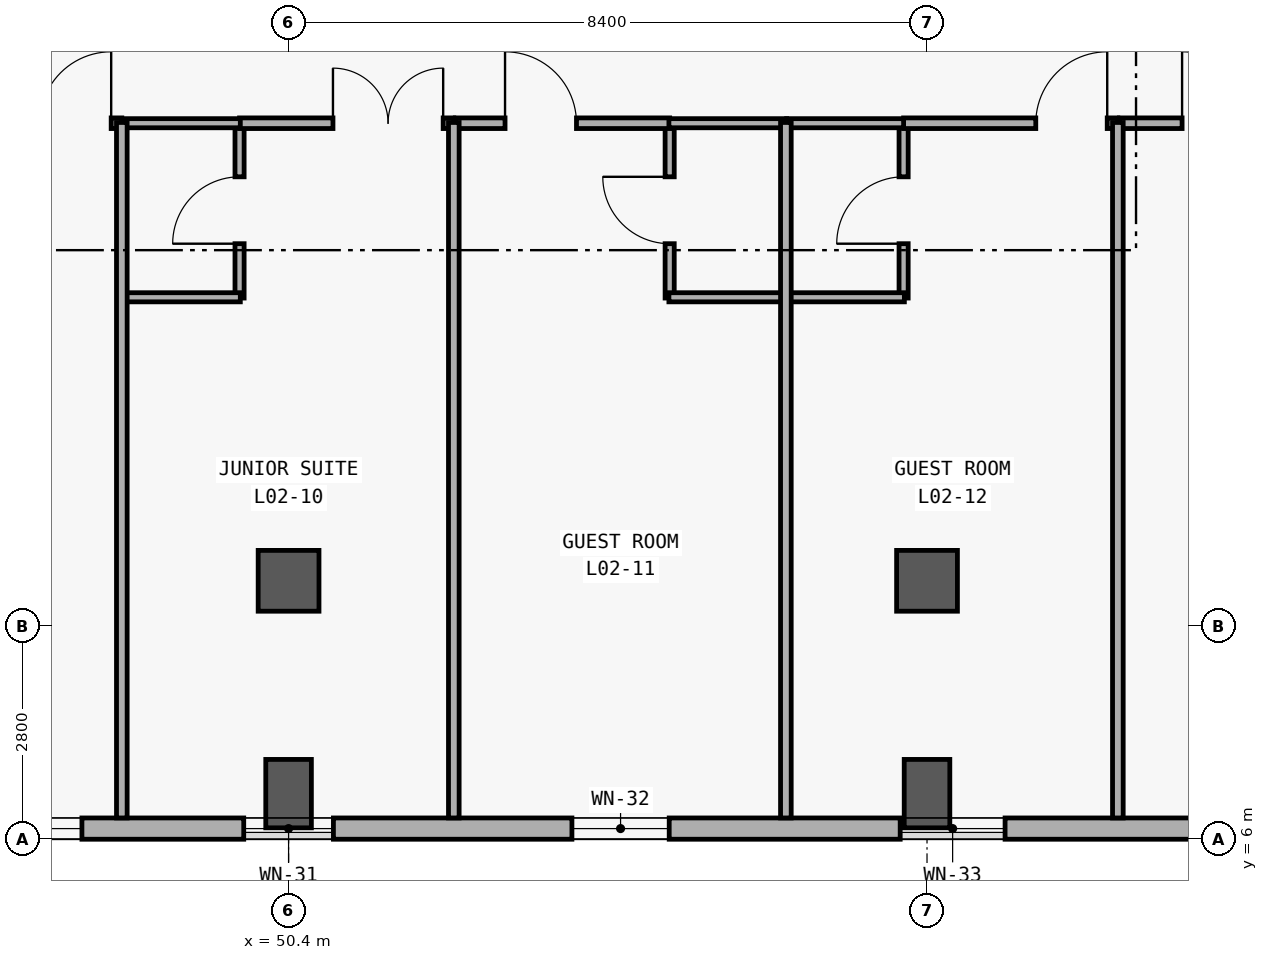
"""IFC4 building model, lengths in metres.
Left out: names, types, materials, properties, quantities, classifications, styles, units other than length and angle.
Written with IfcOpenShell. Run it as: python <this file> out.ifc"""

import sys

from ifc_helpers import new_model, si_unit, direction, frame, frame_2d, origin, origin_2d, place, context, subcontext, project, spatial, rectangle, extrude, element, fill, save


model = new_model("IFC4")
c1 = context("Model", 3, precision=1e-05, world=origin(), true_north=direction((0.0, 1.0)))
c2 = subcontext(c1, "Body", "Model", "MODEL_VIEW")
j1 = project(units=[si_unit("LENGTHUNIT", "METRE"), si_unit("PLANEANGLEUNIT", "RADIAN")], contexts=[c1])
p1 = place(None, origin())
s1 = spatial("IfcSite", under=j1, at=p1, CompositionType="ELEMENT")
p2 = place(p1, origin())
s2 = spatial("IfcBuilding", under=s1, at=p2, CompositionType="ELEMENT")
p3 = place(p2, frame((0.0, 0.0, 10.8)))
s3 = spatial("IfcBuildingStorey", under=s2, at=p3, CompositionType="ELEMENT", Elevation=10.8)
p4 = place(p3, frame((50.4, 6.6, 0.0), z_axis=(0.0, 0.0, 1.0), x_axis=(0.0, 1.0, 0.0)))
e1 = element("IfcColumn", 1, at=p4, inside=s3, PredefinedType="COLUMN", context=c2, shape_type="SweptSolid", body=[
    extrude(rectangle(XDim=0.6, YDim=0.9, at=origin_2d()), origin(), (0.0, 0.0, 1.0), 4.2),
])
p5 = place(p3, frame((50.4, 9.4, 0.0), z_axis=(0.0, 0.0, 1.0), x_axis=(1.0, 0.0, 0.0)))
e2 = element("IfcColumn", 2, at=p5, inside=s3, PredefinedType="COLUMN", context=c2, shape_type="SweptSolid", body=[
    extrude(rectangle(XDim=0.8, YDim=0.8, at=origin_2d()), origin(), (0.0, 0.0, 1.0), 4.2),
])
p6 = place(p3, frame((58.8, 6.6, 0.0), z_axis=(0.0, 0.0, 1.0), x_axis=(0.0, 1.0, 0.0)))
e3 = element("IfcColumn", 3, at=p6, inside=s3, PredefinedType="COLUMN", context=c2, shape_type="SweptSolid", body=[
    extrude(rectangle(XDim=0.6, YDim=0.9, at=origin_2d()), origin(), (0.0, 0.0, 1.0), 4.2),
])
p7 = place(p3, frame((58.8, 9.4, 0.0), z_axis=(0.0, 0.0, 1.0), x_axis=(1.0, 0.0, 0.0)))
e4 = element("IfcColumn", 4, at=p7, inside=s3, PredefinedType="COLUMN", context=c2, shape_type="SweptSolid", body=[
    extrude(rectangle(XDim=0.8, YDim=0.8, at=origin_2d()), origin(), (0.0, 0.0, 1.0), 4.2),
])
p8 = place(p3, frame((92.12, 6.14, 0.0), z_axis=(0.0, 0.0, 1.0), x_axis=(-1.0, 0.0, 0.0)))
e5 = element("IfcWall", 5, at=p8, inside=s3, PredefinedType="SOLIDWALL", context=c2, shape_type="SweptSolid", body=[
    extrude(rectangle(XDim=83.44, YDim=0.28, at=frame_2d((41.72, 0.0))), origin(), (0.0, 0.0, 1.0), 3.92),
])
p9 = place(p8, frame((79.486, 0.0, 0.85)))
e6 = element("IfcOpeningElement", 6, at=p9, cuts=e5, PredefinedType="OPENING", context=c2, shape_type="SweptSolid", body=[
    extrude(rectangle(XDim=3.1, YDim=2.2, at=frame_2d((1.55, 1.1))), frame((0.0, 0.15, 0.0), z_axis=(0.0, -1.0, 0.0), x_axis=(1.0, 0.0, 0.0)), (0.0, 0.0, 1.0), 0.3),
])
p10 = place(p8, frame((76.043, 0.0, 0.85)))
e7 = element("IfcOpeningElement", 7, at=p10, cuts=e5, PredefinedType="OPENING", context=c2, shape_type="SweptSolid", body=[
    extrude(rectangle(XDim=1.25, YDim=1.45, at=frame_2d((0.625, 0.725))), frame((0.0, 0.15, 0.0), z_axis=(0.0, -1.0, 0.0), x_axis=(1.0, 0.0, 0.0)), (0.0, 0.0, 1.0), 0.3),
])
p11 = place(p8, frame((71.624, 0.0, 0.85)))
e8 = element("IfcOpeningElement", 8, at=p11, cuts=e5, PredefinedType="OPENING", context=c2, shape_type="SweptSolid", body=[
    extrude(rectangle(XDim=1.35, YDim=1.55, at=frame_2d((0.675, 0.775))), frame((0.0, 0.15, 0.0), z_axis=(0.0, -1.0, 0.0), x_axis=(1.0, 0.0, 0.0)), (0.0, 0.0, 1.0), 0.3),
])
p12 = place(p8, frame((67.206, 0.0, 0.85)))
e9 = element("IfcOpeningElement", 9, at=p12, cuts=e5, PredefinedType="OPENING", context=c2, shape_type="SweptSolid", body=[
    extrude(rectangle(XDim=1.45, YDim=1.65, at=frame_2d((0.725, 0.825))), frame((0.0, 0.15, 0.0), z_axis=(0.0, -1.0, 0.0), x_axis=(1.0, 0.0, 0.0)), (0.0, 0.0, 1.0), 0.3),
])
p13 = place(p8, frame((62.787, 0.0, 0.85)))
e10 = element("IfcOpeningElement", 10, at=p13, cuts=e5, PredefinedType="OPENING", context=c2, shape_type="SweptSolid", body=[
    extrude(rectangle(XDim=1.55, YDim=1.65, at=frame_2d((0.775, 0.825))), frame((0.0, 0.15, 0.0), z_axis=(0.0, -1.0, 0.0), x_axis=(1.0, 0.0, 0.0)), (0.0, 0.0, 1.0), 0.3),
])
p14 = place(p8, frame((58.344, 0.0, 0.85)))
e11 = element("IfcOpeningElement", 11, at=p14, cuts=e5, PredefinedType="OPENING", context=c2, shape_type="SweptSolid", body=[
    extrude(rectangle(XDim=1.7, YDim=2.0, at=frame_2d((0.85, 1.0))), frame((0.0, 0.15, 0.0), z_axis=(0.0, -1.0, 0.0), x_axis=(1.0, 0.0, 0.0)), (0.0, 0.0, 1.0), 0.3),
])
p15 = place(p8, frame((53.675, 0.0, 0.85)))
e12 = element("IfcOpeningElement", 12, at=p15, cuts=e5, PredefinedType="OPENING", context=c2, shape_type="SweptSolid", body=[
    extrude(rectangle(XDim=2.3, YDim=2.05, at=frame_2d((1.15, 1.025))), frame((0.0, 0.15, 0.0), z_axis=(0.0, -1.0, 0.0), x_axis=(1.0, 0.0, 0.0)), (0.0, 0.0, 1.0), 0.3),
])
p16 = place(p8, frame((49.082, 0.0, 0.85)))
e13 = element("IfcOpeningElement", 13, at=p16, cuts=e5, PredefinedType="OPENING", context=c2, shape_type="SweptSolid", body=[
    extrude(rectangle(XDim=2.75, YDim=2.1, at=frame_2d((1.375, 1.05))), frame((0.0, 0.15, 0.0), z_axis=(0.0, -1.0, 0.0), x_axis=(1.0, 0.0, 0.0)), (0.0, 0.0, 1.0), 0.3),
])
p17 = place(p8, frame((44.439, 0.0, 0.85)))
e14 = element("IfcOpeningElement", 14, at=p17, cuts=e5, PredefinedType="OPENING", context=c2, shape_type="SweptSolid", body=[
    extrude(rectangle(XDim=3.3, YDim=2.15, at=frame_2d((1.65, 1.075))), frame((0.0, 0.15, 0.0), z_axis=(0.0, -1.0, 0.0), x_axis=(1.0, 0.0, 0.0)), (0.0, 0.0, 1.0), 0.3),
])
p18 = place(p8, frame((41.13, 0.0, 0.85)))
e15 = element("IfcOpeningElement", 15, at=p18, cuts=e5, PredefinedType="OPENING", context=c2, shape_type="SweptSolid", body=[
    extrude(rectangle(XDim=1.18, YDim=1.5, at=frame_2d((0.59, 0.75))), frame((0.0, 0.15, 0.0), z_axis=(0.0, -1.0, 0.0), x_axis=(1.0, 0.0, 0.0)), (0.0, 0.0, 1.0), 0.3),
])
p19 = place(p8, frame((36.712, 0.0, 0.85)))
e16 = element("IfcOpeningElement", 16, at=p19, cuts=e5, PredefinedType="OPENING", context=c2, shape_type="SweptSolid", body=[
    extrude(rectangle(XDim=1.28, YDim=1.6, at=frame_2d((0.64, 0.8))), frame((0.0, 0.15, 0.0), z_axis=(0.0, -1.0, 0.0), x_axis=(1.0, 0.0, 0.0)), (0.0, 0.0, 1.0), 0.3),
])
p20 = place(p8, frame((32.293, 0.0, 0.85)))
e17 = element("IfcOpeningElement", 17, at=p20, cuts=e5, PredefinedType="OPENING", context=c2, shape_type="SweptSolid", body=[
    extrude(rectangle(XDim=1.38, YDim=1.7, at=frame_2d((0.69, 0.85))), frame((0.0, 0.15, 0.0), z_axis=(0.0, -1.0, 0.0), x_axis=(1.0, 0.0, 0.0)), (0.0, 0.0, 1.0), 0.3),
])
p21 = place(p8, frame((27.875, 0.0, 0.85)))
e18 = element("IfcOpeningElement", 18, at=p21, cuts=e5, PredefinedType="OPENING", context=c2, shape_type="SweptSolid", body=[
    extrude(rectangle(XDim=1.48, YDim=1.8, at=frame_2d((0.74, 0.9))), frame((0.0, 0.15, 0.0), z_axis=(0.0, -1.0, 0.0), x_axis=(1.0, 0.0, 0.0)), (0.0, 0.0, 1.0), 0.3),
])
p22 = place(p8, frame((23.456, 0.0, 0.85)))
e19 = element("IfcOpeningElement", 19, at=p22, cuts=e5, PredefinedType="OPENING", context=c2, shape_type="SweptSolid", body=[
    extrude(rectangle(XDim=1.58, YDim=1.85, at=frame_2d((0.79, 0.925))), frame((0.0, 0.15, 0.0), z_axis=(0.0, -1.0, 0.0), x_axis=(1.0, 0.0, 0.0)), (0.0, 0.0, 1.0), 0.3),
])
p23 = place(p8, frame((19.038, 0.0, 0.85)))
e20 = element("IfcOpeningElement", 20, at=p23, cuts=e5, PredefinedType="OPENING", context=c2, shape_type="SweptSolid", body=[
    extrude(rectangle(XDim=1.68, YDim=1.9, at=frame_2d((0.84, 0.95))), frame((0.0, 0.15, 0.0), z_axis=(0.0, -1.0, 0.0), x_axis=(1.0, 0.0, 0.0)), (0.0, 0.0, 1.0), 0.3),
])
p24 = place(p8, frame((14.62, 0.0, 0.85)))
e21 = element("IfcOpeningElement", 21, at=p24, cuts=e5, PredefinedType="OPENING", context=c2, shape_type="SweptSolid", body=[
    extrude(rectangle(XDim=1.78, YDim=1.95, at=frame_2d((0.89, 0.975))), frame((0.0, 0.15, 0.0), z_axis=(0.0, -1.0, 0.0), x_axis=(1.0, 0.0, 0.0)), (0.0, 0.0, 1.0), 0.3),
])
p25 = place(p8, frame((10.201, 0.0, 0.85)))
e22 = element("IfcOpeningElement", 22, at=p25, cuts=e5, PredefinedType="OPENING", context=c2, shape_type="SweptSolid", body=[
    extrude(rectangle(XDim=1.88, YDim=1.95, at=frame_2d((0.94, 0.975))), frame((0.0, 0.15, 0.0), z_axis=(0.0, -1.0, 0.0), x_axis=(1.0, 0.0, 0.0)), (0.0, 0.0, 1.0), 0.3),
])
p26 = place(p8, frame((5.748, 0.0, 0.85)))
e23 = element("IfcOpeningElement", 23, at=p26, cuts=e5, PredefinedType="OPENING", context=c2, shape_type="SweptSolid", body=[
    extrude(rectangle(XDim=2.05, YDim=1.95, at=frame_2d((1.025, 0.975))), frame((0.0, 0.15, 0.0), z_axis=(0.0, -1.0, 0.0), x_axis=(1.0, 0.0, 0.0)), (0.0, 0.0, 1.0), 0.3),
])
p27 = place(p8, frame((1.314, 0.0, 0.85)))
e24 = element("IfcOpeningElement", 24, at=p27, cuts=e5, PredefinedType="OPENING", context=c2, shape_type="SweptSolid", body=[
    extrude(rectangle(XDim=2.18, YDim=1.95, at=frame_2d((1.09, 0.975))), frame((0.0, 0.15, 0.0), z_axis=(0.0, -1.0, 0.0), x_axis=(1.0, 0.0, 0.0)), (0.0, 0.0, 1.0), 0.3),
])
p28 = place(p3, frame((49.755, 13.12, 0.0), z_axis=(0.0, 0.0, 1.0), x_axis=(0.0, 1.0, 0.0)))
e25 = element("IfcWall", 25, at=p28, inside=s3, PredefinedType="PARTITIONING", context=c2, shape_type="SweptSolid", body=[
    extrude(rectangle(XDim=2.31, YDim=0.12, at=frame_2d((1.155, 0.0))), origin(), (0.0, 0.0, 1.0), 3.02),
])
p29 = place(p28, frame((0.715, 0.0, 0.0)))
e26 = element("IfcOpeningElement", 26, at=p29, cuts=e25, PredefinedType="OPENING", context=c2, shape_type="SweptSolid", body=[
    extrude(rectangle(XDim=0.88, YDim=2.15, at=frame_2d((0.44, 1.075))), frame((0.0, 0.07, 0.0), z_axis=(0.0, -1.0, 0.0), x_axis=(1.0, 0.0, 0.0)), (0.0, 0.0, 1.0), 0.14),
])
p30 = place(p3, frame((55.414, 13.12, 0.0), z_axis=(0.0, 0.0, 1.0), x_axis=(0.0, 1.0, 0.0)))
e27 = element("IfcWall", 27, at=p30, inside=s3, PredefinedType="PARTITIONING", context=c2, shape_type="SweptSolid", body=[
    extrude(rectangle(XDim=2.31, YDim=0.12, at=frame_2d((1.155, 0.0))), origin(), (0.0, 0.0, 1.0), 3.02),
])
p31 = place(p30, frame((0.715, 0.0, 0.0)))
e28 = element("IfcOpeningElement", 28, at=p31, cuts=e27, PredefinedType="OPENING", context=c2, shape_type="SweptSolid", body=[
    extrude(rectangle(XDim=0.88, YDim=2.15, at=frame_2d((0.44, 1.075))), frame((0.0, 0.07, 0.0), z_axis=(0.0, -1.0, 0.0), x_axis=(1.0, 0.0, 0.0)), (0.0, 0.0, 1.0), 0.14),
])
p32 = place(p3, frame((58.492, 13.12, 0.0), z_axis=(0.0, 0.0, 1.0), x_axis=(0.0, 1.0, 0.0)))
e29 = element("IfcWall", 29, at=p32, inside=s3, PredefinedType="PARTITIONING", context=c2, shape_type="SweptSolid", body=[
    extrude(rectangle(XDim=2.31, YDim=0.12, at=frame_2d((1.155, 0.0))), origin(), (0.0, 0.0, 1.0), 3.02),
])
p33 = place(p32, frame((0.715, 0.0, 0.0)))
e30 = element("IfcOpeningElement", 30, at=p33, cuts=e29, PredefinedType="OPENING", context=c2, shape_type="SweptSolid", body=[
    extrude(rectangle(XDim=0.88, YDim=2.15, at=frame_2d((0.44, 1.075))), frame((0.0, 0.07, 0.0), z_axis=(0.0, -1.0, 0.0), x_axis=(1.0, 0.0, 0.0)), (0.0, 0.0, 1.0), 0.14),
])
p34 = place(p3, frame((45.386, 15.42, 0.0), z_axis=(0.0, 0.0, 1.0), x_axis=(1.0, 0.0, 0.0)))
e31 = element("IfcWall", 31, at=p34, inside=s3, PredefinedType="PARTITIONING", context=c2, shape_type="SweptSolid", body=[
    extrude(rectangle(XDim=2.82, YDim=0.14, at=frame_2d((1.41, 0.0))), origin(), (0.0, 0.0, 1.0), 3.02),
])
p35 = place(p34, frame((1.74, 0.0, 0.0)))
e32 = element("IfcOpeningElement", 32, at=p35, cuts=e31, PredefinedType="OPENING", context=c2, shape_type="SweptSolid", body=[
    extrude(rectangle(XDim=0.94, YDim=2.2, at=frame_2d((0.47, 1.1))), frame((0.0, 0.08, 0.0), z_axis=(0.0, -1.0, 0.0), x_axis=(1.0, 0.0, 0.0)), (0.0, 0.0, 1.0), 0.16),
])
p36 = place(p3, frame((49.755, 15.42, 0.0), z_axis=(0.0, 0.0, 1.0), x_axis=(1.0, 0.0, 0.0)))
e33 = element("IfcWall", 33, at=p36, inside=s3, PredefinedType="PARTITIONING", context=c2, shape_type="SweptSolid", body=[
    extrude(rectangle(XDim=2.819, YDim=0.14, at=frame_2d((1.41, 0.0))), origin(), (0.0, 0.0, 1.0), 3.02),
])
p37 = place(p36, frame((1.229, 0.0, 0.0)))
e34 = element("IfcOpeningElement", 34, at=p37, cuts=e33, PredefinedType="OPENING", context=c2, shape_type="SweptSolid", body=[
    extrude(rectangle(XDim=1.45, YDim=2.3, at=frame_2d((0.725, 1.15))), frame((0.0, 0.08, 0.0), z_axis=(0.0, -1.0, 0.0), x_axis=(1.0, 0.0, 0.0)), (0.0, 0.0, 1.0), 0.16),
])
p38 = place(p3, frame((52.594, 15.42, 0.0), z_axis=(0.0, 0.0, 1.0), x_axis=(1.0, 0.0, 0.0)))
e35 = element("IfcWall", 35, at=p38, inside=s3, PredefinedType="PARTITIONING", context=c2, shape_type="SweptSolid", body=[
    extrude(rectangle(XDim=2.82, YDim=0.14, at=frame_2d((1.41, 0.0))), origin(), (0.0, 0.0, 1.0), 3.02),
])
p39 = place(p38, frame((0.654, 0.0, 0.0)))
e36 = element("IfcOpeningElement", 36, at=p39, cuts=e35, PredefinedType="OPENING", context=c2, shape_type="SweptSolid", body=[
    extrude(rectangle(XDim=0.94, YDim=2.2, at=frame_2d((0.47, 1.1))), frame((0.0, 0.08, 0.0), z_axis=(0.0, -1.0, 0.0), x_axis=(1.0, 0.0, 0.0)), (0.0, 0.0, 1.0), 0.16),
])
p40 = place(p3, frame((58.492, 15.42, 0.0), z_axis=(0.0, 0.0, 1.0), x_axis=(1.0, 0.0, 0.0)))
e37 = element("IfcWall", 37, at=p40, inside=s3, PredefinedType="PARTITIONING", context=c2, shape_type="SweptSolid", body=[
    extrude(rectangle(XDim=2.819, YDim=0.14, at=frame_2d((1.41, 0.0))), origin(), (0.0, 0.0, 1.0), 3.02),
])
p41 = place(p40, frame((1.739, 0.0, 0.0)))
e38 = element("IfcOpeningElement", 38, at=p41, cuts=e37, PredefinedType="OPENING", context=c2, shape_type="SweptSolid", body=[
    extrude(rectangle(XDim=0.94, YDim=2.2, at=frame_2d((0.47, 1.1))), frame((0.0, 0.08, 0.0), z_axis=(0.0, -1.0, 0.0), x_axis=(1.0, 0.0, 0.0)), (0.0, 0.0, 1.0), 0.16),
])
p42 = place(p3, frame((61.331, 15.42, 0.0), z_axis=(0.0, 0.0, 1.0), x_axis=(1.0, 0.0, 0.0)))
e39 = element("IfcWall", 39, at=p42, inside=s3, PredefinedType="PARTITIONING", context=c2, shape_type="SweptSolid", body=[
    extrude(rectangle(XDim=2.819, YDim=0.14, at=frame_2d((1.409, 0.0))), origin(), (0.0, 0.0, 1.0), 3.02),
])
p43 = place(p42, frame((0.825, 0.0, 0.0)))
e40 = element("IfcOpeningElement", 40, at=p43, cuts=e39, PredefinedType="OPENING", context=c2, shape_type="SweptSolid", body=[
    extrude(rectangle(XDim=0.94, YDim=2.2, at=frame_2d((0.47, 1.1))), frame((0.0, 0.08, 0.0), z_axis=(0.0, -1.0, 0.0), x_axis=(1.0, 0.0, 0.0)), (0.0, 0.0, 1.0), 0.16),
])
for number, where, z_axis, x_axis in (
    (41, (48.216, 13.13, 0.0), (0.0, 0.0, 1.0), (1.0, 0.0, 0.0)),
    (42, (48.216, 15.42, 0.0), (0.0, 0.0, 1.0), (1.0, 0.0, 0.0)),
    (43, (55.404, 13.13, 0.0), (0.0, 0.0, 1.0), (1.0, 0.0, 0.0)),
    (44, (55.404, 15.42, 0.0), (0.0, 0.0, 1.0), (1.0, 0.0, 0.0)),
):
    element("IfcWall", number, at=place(p3, frame(where, z_axis=z_axis, x_axis=x_axis)), inside=s3, PredefinedType="PARTITIONING", context=c2, shape_type="SweptSolid", body=[
        extrude(rectangle(XDim=1.549, YDim=0.12, at=frame_2d((0.774, 0.0))), origin(), (0.0, 0.0, 1.0), 3.02),
    ])
p44 = place(p3, frame((56.953, 13.13, 0.0), z_axis=(0.0, 0.0, 1.0), x_axis=(1.0, 0.0, 0.0)))
e45 = element("IfcWall", 45, at=p44, inside=s3, PredefinedType="PARTITIONING", context=c2, shape_type="SweptSolid", body=[
    extrude(rectangle(XDim=1.549, YDim=0.12, at=frame_2d((0.774, 0.0))), origin(), (0.0, 0.0, 1.0), 3.02),
])
p45 = place(p3, frame((56.953, 15.42, 0.0), z_axis=(0.0, 0.0, 1.0), x_axis=(1.0, 0.0, 0.0)))
e46 = element("IfcWall", 46, at=p45, inside=s3, PredefinedType="PARTITIONING", context=c2, shape_type="SweptSolid", body=[
    extrude(rectangle(XDim=1.539, YDim=0.12, at=frame_2d((0.77, 0.0))), origin(), (0.0, 0.0, 1.0), 3.02),
])
for number, where, z_axis, x_axis in (
    (47, (48.206, 6.28, 0.0), (0.0, 0.0, 1.0), (0.0, 1.0, 0.0)),
    (48, (52.574, 6.28, 0.0), (0.0, 0.0, 1.0), (0.0, 1.0, 0.0)),
    (49, (56.943, 6.28, 0.0), (0.0, 0.0, 1.0), (0.0, 1.0, 0.0)),
    (50, (61.311, 6.28, 0.0), (0.0, 0.0, 1.0), (0.0, 1.0, 0.0)),
):
    element("IfcWall", number, at=place(p3, frame(where, z_axis=z_axis, x_axis=x_axis)), inside=s3, PredefinedType="PARTITIONING", context=c2, shape_type="SweptSolid", body=[
        extrude(rectangle(XDim=9.15, YDim=0.14, at=frame_2d((4.575, 0.0))), origin(), (0.0, 0.0, 1.0), 3.02),
    ])
p46 = place(p17, origin())
e51 = element("IfcWindow", 51, at=p46, inside=s3, PartitioningType="SINGLE_PANEL", PredefinedType="WINDOW", context=c2, shape_type="SweptSolid", body=[
    extrude(rectangle(XDim=3.3, YDim=2.15, at=frame_2d((1.65, 1.075))), frame((0.0, 0.03, 0.0), z_axis=(0.0, -1.0, 0.0), x_axis=(1.0, 0.0, 0.0)), (0.0, 0.0, 1.0), 0.06),
])
fill(e14, e51)
p47 = place(p18, origin())
e52 = element("IfcWindow", 52, at=p47, inside=s3, PartitioningType="SINGLE_PANEL", PredefinedType="WINDOW", context=c2, shape_type="SweptSolid", body=[
    extrude(rectangle(XDim=1.18, YDim=1.5, at=frame_2d((0.59, 0.75))), frame((0.0, 0.03, 0.0), z_axis=(0.0, -1.0, 0.0), x_axis=(1.0, 0.0, 0.0)), (0.0, 0.0, 1.0), 0.06),
])
fill(e15, e52)
p48 = place(p19, origin())
e53 = element("IfcWindow", 53, at=p48, inside=s3, PartitioningType="SINGLE_PANEL", PredefinedType="WINDOW", context=c2, shape_type="SweptSolid", body=[
    extrude(rectangle(XDim=1.28, YDim=1.6, at=frame_2d((0.64, 0.8))), frame((0.0, 0.03, 0.0), z_axis=(0.0, -1.0, 0.0), x_axis=(1.0, 0.0, 0.0)), (0.0, 0.0, 1.0), 0.06),
])
fill(e16, e53)
p49 = place(p20, origin())
e54 = element("IfcWindow", 54, at=p49, inside=s3, PartitioningType="SINGLE_PANEL", PredefinedType="WINDOW", context=c2, shape_type="SweptSolid", body=[
    extrude(rectangle(XDim=1.38, YDim=1.7, at=frame_2d((0.69, 0.85))), frame((0.0, 0.03, 0.0), z_axis=(0.0, -1.0, 0.0), x_axis=(1.0, 0.0, 0.0)), (0.0, 0.0, 1.0), 0.06),
])
fill(e17, e54)
p50 = place(p29, origin())
e55 = element("IfcDoor", 55, at=p50, inside=s3, OperationType="SINGLE_SWING_LEFT", PredefinedType="DOOR", context=c2, shape_type="SweptSolid", body=[
    extrude(rectangle(XDim=0.88, YDim=2.15, at=frame_2d((0.44, 1.075))), frame((0.0, 0.025, 0.0), z_axis=(0.0, -1.0, 0.0), x_axis=(1.0, 0.0, 0.0)), (0.0, 0.0, 1.0), 0.05),
])
fill(e26, e55)
p51 = place(p31, origin())
e56 = element("IfcDoor", 56, at=p51, inside=s3, OperationType="SINGLE_SWING_RIGHT", PredefinedType="DOOR", context=c2, shape_type="SweptSolid", body=[
    extrude(rectangle(XDim=0.88, YDim=2.15, at=frame_2d((0.44, 1.075))), frame((0.0, 0.025, 0.0), z_axis=(0.0, -1.0, 0.0), x_axis=(1.0, 0.0, 0.0)), (0.0, 0.0, 1.0), 0.05),
])
fill(e28, e56)
p52 = place(p33, origin())
e57 = element("IfcDoor", 57, at=p52, inside=s3, OperationType="SINGLE_SWING_LEFT", PredefinedType="DOOR", context=c2, shape_type="SweptSolid", body=[
    extrude(rectangle(XDim=0.88, YDim=2.15, at=frame_2d((0.44, 1.075))), frame((0.0, 0.025, 0.0), z_axis=(0.0, -1.0, 0.0), x_axis=(1.0, 0.0, 0.0)), (0.0, 0.0, 1.0), 0.05),
])
fill(e30, e57)
p53 = place(p35, origin())
e58 = element("IfcDoor", 58, at=p53, inside=s3, OperationType="SINGLE_SWING_RIGHT", PredefinedType="DOOR", context=c2, shape_type="SweptSolid", body=[
    extrude(rectangle(XDim=0.94, YDim=2.2, at=frame_2d((0.47, 1.1))), frame((0.0, 0.025, 0.0), z_axis=(0.0, -1.0, 0.0), x_axis=(1.0, 0.0, 0.0)), (0.0, 0.0, 1.0), 0.05),
])
fill(e32, e58)
p54 = place(p37, origin())
e59 = element("IfcDoor", 59, at=p54, inside=s3, OperationType="DOUBLE_DOOR_SINGLE_SWING", PredefinedType="DOOR", context=c2, shape_type="SweptSolid", body=[
    extrude(rectangle(XDim=1.45, YDim=2.3, at=frame_2d((0.725, 1.15))), frame((0.0, 0.025, 0.0), z_axis=(0.0, -1.0, 0.0), x_axis=(1.0, 0.0, 0.0)), (0.0, 0.0, 1.0), 0.05),
])
fill(e34, e59)
p55 = place(p39, origin())
e60 = element("IfcDoor", 60, at=p55, inside=s3, OperationType="SINGLE_SWING_LEFT", PredefinedType="DOOR", context=c2, shape_type="SweptSolid", body=[
    extrude(rectangle(XDim=0.94, YDim=2.2, at=frame_2d((0.47, 1.1))), frame((0.0, 0.025, 0.0), z_axis=(0.0, -1.0, 0.0), x_axis=(1.0, 0.0, 0.0)), (0.0, 0.0, 1.0), 0.05),
])
fill(e36, e60)
p56 = place(p41, origin())
e61 = element("IfcDoor", 61, at=p56, inside=s3, OperationType="SINGLE_SWING_RIGHT", PredefinedType="DOOR", context=c2, shape_type="SweptSolid", body=[
    extrude(rectangle(XDim=0.94, YDim=2.2, at=frame_2d((0.47, 1.1))), frame((0.0, 0.025, 0.0), z_axis=(0.0, -1.0, 0.0), x_axis=(1.0, 0.0, 0.0)), (0.0, 0.0, 1.0), 0.05),
])
fill(e38, e61)
p57 = place(p43, origin())
e62 = element("IfcDoor", 62, at=p57, inside=s3, OperationType="SINGLE_SWING_LEFT", PredefinedType="DOOR", context=c2, shape_type="SweptSolid", body=[
    extrude(rectangle(XDim=0.94, YDim=2.2, at=frame_2d((0.47, 1.1))), frame((0.0, 0.025, 0.0), z_axis=(0.0, -1.0, 0.0), x_axis=(1.0, 0.0, 0.0)), (0.0, 0.0, 1.0), 0.05),
])
fill(e40, e62)
save(model, sys.argv[1])
